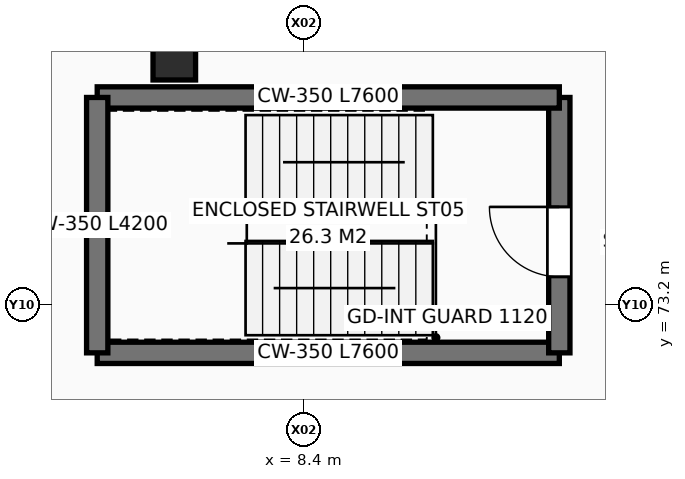
"""IFC4 building model, lengths in metres.
Left out: names, types, materials, properties, quantities, classifications, styles, units other than length and angle.
Written with IfcOpenShell. Run it as: python <this file> out.ifc"""

import sys

from ifc_helpers import new_model, si_unit, direction, frame, frame_2d, origin, origin_2d, place, context, subcontext, project, spatial, rectangle, circle, extrude, element, fill, save


model = new_model("IFC4")
c1 = context("Model", 3, precision=1e-05, world=origin(), true_north=direction((0.0, 1.0)))
c2 = subcontext(c1, "Body", "Model", "MODEL_VIEW")
j1 = project(units=[si_unit("LENGTHUNIT", "METRE"), si_unit("PLANEANGLEUNIT", "RADIAN")], contexts=[c1])
p1 = place(None, origin())
s1 = spatial("IfcSite", under=j1, at=p1, CompositionType="ELEMENT")
p2 = place(p1, origin())
s2 = spatial("IfcBuilding", under=s1, at=p2, CompositionType="ELEMENT")
p3 = place(p2, frame((0.0, 0.0, 5.4)))
s3 = spatial("IfcBuildingStorey", under=s2, at=p3, CompositionType="ELEMENT", Elevation=5.4)
p4 = place(p3, frame((6.268, 77.237, 0.0), z_axis=(0.0, 0.0, 1.0), x_axis=(1.0, 0.0, 0.0)))
e1 = element("IfcColumn", 1, at=p4, inside=s3, PredefinedType="COLUMN", context=c2, shape_type="SweptSolid", body=[
    extrude(circle(Radius=0.35, at=origin_2d()), origin(), (0.0, 0.0, 1.0), 4.2),
])
p5 = place(p3, frame((3.198, 72.037, 0.0), z_axis=(0.0, 0.0, 1.0), x_axis=(0.707128150708, -0.707085411019, 0.0)))
e2 = element("IfcWall", 2, at=p5, inside=s3, PredefinedType="SOLIDWALL", context=c2, shape_type="SweptSolid", body=[
    extrude(rectangle(XDim=5.712, YDim=0.38, at=frame_2d((2.856, 0.0))), origin(), (0.0, 0.0, 1.0), 3.13),
])
p6 = place(p5, frame((2.306, 0.0, 0.9)))
e3 = element("IfcOpeningElement", 3, at=p6, cuts=e2, PredefinedType="OPENING", context=c2, shape_type="SweptSolid", body=[
    extrude(rectangle(XDim=1.1, YDim=1.8, at=frame_2d((0.55, 0.9))), frame((0.0, 0.2, 0.0), z_axis=(0.0, -1.0, 0.0), x_axis=(1.0, 0.0, 0.0)), (0.0, 0.0, 1.0), 0.4),
])
p7 = place(p3, frame((5.0, 72.4, 0.0), z_axis=(0.0, 0.0, 1.0), x_axis=(1.0, 0.0, 0.0)))
e4 = element("IfcWall", 4, at=p7, inside=s3, PredefinedType="SHEAR", context=c2, shape_type="SweptSolid", body=[
    extrude(rectangle(XDim=7.6, YDim=0.35, at=frame_2d((3.8, 0.0))), origin(), (0.0, 0.0, 1.0), 3.92),
])
p8 = place(p3, frame((12.6, 72.4, 0.0), z_axis=(0.0, 0.0, 1.0), x_axis=(0.0, 1.0, 0.0)))
e5 = element("IfcWall", 5, at=p8, inside=s3, PredefinedType="SHEAR", context=c2, shape_type="SweptSolid", body=[
    extrude(rectangle(XDim=4.2, YDim=0.35, at=frame_2d((2.1, 0.0))), origin(), (0.0, 0.0, 1.0), 3.92),
])
p9 = place(p8, frame((1.25, 0.0, 0.0)))
e6 = element("IfcOpeningElement", 6, at=p9, cuts=e5, PredefinedType="OPENING", context=c2, shape_type="SweptSolid", body=[
    extrude(rectangle(XDim=1.15, YDim=2.2, at=frame_2d((0.575, 1.1))), frame((0.0, 0.185, 0.0), z_axis=(0.0, -1.0, 0.0), x_axis=(1.0, 0.0, 0.0)), (0.0, 0.0, 1.0), 0.37),
])
p10 = place(p3, frame((12.6, 76.6, 0.0), z_axis=(0.0, 0.0, 1.0), x_axis=(-1.0, 0.0, 0.0)))
e7 = element("IfcWall", 7, at=p10, inside=s3, PredefinedType="SHEAR", context=c2, shape_type="SweptSolid", body=[
    extrude(rectangle(XDim=7.6, YDim=0.35, at=frame_2d((3.8, 0.0))), origin(), (0.0, 0.0, 1.0), 3.92),
])
p11 = place(p3, frame((5.0, 76.6, 0.0), z_axis=(0.0, 0.0, 1.0), x_axis=(0.0, -1.0, 0.0)))
e8 = element("IfcWall", 8, at=p11, inside=s3, PredefinedType="SHEAR", context=c2, shape_type="SweptSolid", body=[
    extrude(rectangle(XDim=4.2, YDim=0.35, at=frame_2d((2.1, 0.0))), origin(), (0.0, 0.0, 1.0), 3.92),
])
p12 = place(p9, origin())
e9 = element("IfcDoor", 9, at=p12, inside=s3, OperationType="SINGLE_SWING_RIGHT", PredefinedType="DOOR", context=c2, shape_type="SweptSolid", body=[
    extrude(rectangle(XDim=1.15, YDim=2.2, at=frame_2d((0.575, 1.1))), frame((0.0, 0.025, 0.0), z_axis=(0.0, -1.0, 0.0), x_axis=(1.0, 0.0, 0.0)), (0.0, 0.0, 1.0), 0.05),
])
fill(e6, e9)
save(model, sys.argv[1])
